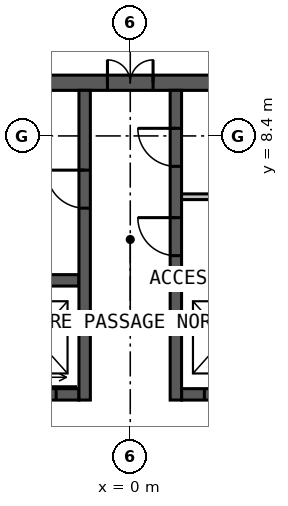
"""IFC4 building model, lengths in metres.
Left out: names, types, materials, properties, quantities, classifications, styles, units other than length and angle.
Written with IfcOpenShell. Run it as: python <this file> out.ifc"""

import sys

from ifc_helpers import new_model, si_unit, direction, frame, frame_2d, origin, place, context, subcontext, project, spatial, rectangle, extrude, element, fill, save


model = new_model("IFC4")
c1 = context("Model", 3, precision=1e-05, world=origin(), true_north=direction((0.0, 1.0)))
c2 = subcontext(c1, "Body", "Model", "MODEL_VIEW")
j1 = project(units=[si_unit("LENGTHUNIT", "METRE"), si_unit("PLANEANGLEUNIT", "RADIAN")], contexts=[c1])
p1 = place(None, origin())
s1 = spatial("IfcSite", under=j1, at=p1, CompositionType="ELEMENT")
p2 = place(p1, origin())
s2 = spatial("IfcBuilding", under=s1, at=p2, CompositionType="ELEMENT")
p3 = place(p2, frame((0.0, 0.0, 276.0)))
s3 = spatial("IfcBuildingStorey", under=s2, at=p3, CompositionType="ELEMENT", Elevation=276.0)
p4 = place(p3, frame((-10.0, 9.8, 0.0), z_axis=(0.0, 0.0, 1.0), x_axis=(1.0, 0.0, 0.0)))
e1 = element("IfcWall", 1, at=p4, inside=s3, PredefinedType="SOLIDWALL", context=c2, shape_type="SweptSolid", body=[
    extrude(rectangle(XDim=20.0, YDim=0.4, at=frame_2d((10.0, 0.0))), origin(), (0.0, 0.0, 1.0), 4.0),
])
p5 = place(p4, frame((9.4, 0.0, 0.0)))
e2 = element("IfcOpeningElement", 2, at=p5, cuts=e1, PredefinedType="OPENING", context=c2, shape_type="SweptSolid", body=[
    extrude(rectangle(XDim=1.2, YDim=2.2, at=frame_2d((0.6, 1.1))), frame((0.0, 0.21, 0.0), z_axis=(0.0, -1.0, 0.0), x_axis=(1.0, 0.0, 0.0)), (0.0, 0.0, 1.0), 0.42),
])
p6 = place(p3, frame((-6.2, 1.6, 0.0), z_axis=(0.0, 0.0, 1.0), x_axis=(1.0, 0.0, 0.0)))
e3 = element("IfcWall", 3, at=p6, inside=s3, PredefinedType="SOLIDWALL", context=c2, shape_type="SweptSolid", body=[
    extrude(rectangle(XDim=4.85, YDim=0.3, at=frame_2d((2.425, 0.0))), origin(), (0.0, 0.0, 1.0), 4.0),
])
p7 = place(p6, frame((0.625, 0.0, 0.0)))
e4 = element("IfcOpeningElement", 4, at=p7, cuts=e3, PredefinedType="OPENING", context=c2, shape_type="SweptSolid", body=[
    extrude(rectangle(XDim=1.1, YDim=2.2, at=frame_2d((0.55, 1.1))), frame((0.0, 0.16, 0.0), z_axis=(0.0, -1.0, 0.0), x_axis=(1.0, 0.0, 0.0)), (0.0, 0.0, 1.0), 0.32),
])
p8 = place(p6, frame((3.15, 0.0, 0.0)))
e5 = element("IfcOpeningElement", 5, at=p8, cuts=e3, PredefinedType="OPENING", context=c2, shape_type="SweptSolid", body=[
    extrude(rectangle(XDim=1.1, YDim=2.2, at=frame_2d((0.55, 1.1))), frame((0.0, 0.16, 0.0), z_axis=(0.0, -1.0, 0.0), x_axis=(1.0, 0.0, 0.0)), (0.0, 0.0, 1.0), 0.32),
])
p9 = place(p3, frame((1.35, 1.6, 0.0), z_axis=(0.0, 0.0, 1.0), x_axis=(1.0, 0.0, 0.0)))
e6 = element("IfcWall", 6, at=p9, inside=s3, PredefinedType="SOLIDWALL", context=c2, shape_type="SweptSolid", body=[
    extrude(rectangle(XDim=4.85, YDim=0.3, at=frame_2d((2.425, 0.0))), origin(), (0.0, 0.0, 1.0), 4.0),
])
p10 = place(p9, frame((0.6, 0.0, 0.0)))
e7 = element("IfcOpeningElement", 7, at=p10, cuts=e6, PredefinedType="OPENING", context=c2, shape_type="SweptSolid", body=[
    extrude(rectangle(XDim=1.1, YDim=2.2, at=frame_2d((0.55, 1.1))), frame((0.0, 0.16, 0.0), z_axis=(0.0, -1.0, 0.0), x_axis=(1.0, 0.0, 0.0)), (0.0, 0.0, 1.0), 0.32),
])
p11 = place(p9, frame((3.125, 0.0, 0.0)))
e8 = element("IfcOpeningElement", 8, at=p11, cuts=e6, PredefinedType="OPENING", context=c2, shape_type="SweptSolid", body=[
    extrude(rectangle(XDim=1.1, YDim=2.2, at=frame_2d((0.55, 1.1))), frame((0.0, 0.16, 0.0), z_axis=(0.0, -1.0, 0.0), x_axis=(1.0, 0.0, 0.0)), (0.0, 0.0, 1.0), 0.32),
])
for number, where, z_axis, x_axis in (
    (9, (-6.2, 4.6, 0.0), (0.0, 0.0, 1.0), (1.0, 0.0, 0.0)),
    (10, (1.35, 4.6, 0.0), (0.0, 0.0, 1.0), (1.0, 0.0, 0.0)),
):
    element("IfcWall", number, at=place(p3, frame(where, z_axis=z_axis, x_axis=x_axis)), inside=s3, PredefinedType="SOLIDWALL", context=c2, shape_type="SweptSolid", body=[
        extrude(rectangle(XDim=4.85, YDim=0.3, at=frame_2d((2.425, 0.0))), origin(), (0.0, 0.0, 1.0), 4.0),
    ])
p12 = place(p3, frame((-1.2, 1.45, 0.0), z_axis=(0.0, 0.0, 1.0), x_axis=(0.0, 1.0, 0.0)))
e11 = element("IfcWall", 11, at=p12, inside=s3, PredefinedType="SOLIDWALL", context=c2, shape_type="SweptSolid", body=[
    extrude(rectangle(XDim=8.15, YDim=0.3, at=frame_2d((4.075, 0.0))), origin(), (0.0, 0.0, 1.0), 4.0),
])
p13 = place(p12, frame((5.05, 0.0, 0.0)))
e12 = element("IfcOpeningElement", 12, at=p13, cuts=e11, PredefinedType="OPENING", context=c2, shape_type="SweptSolid", body=[
    extrude(rectangle(XDim=1.0, YDim=2.2, at=frame_2d((0.5, 1.1))), frame((0.0, 0.16, 0.0), z_axis=(0.0, -1.0, 0.0), x_axis=(1.0, 0.0, 0.0)), (0.0, 0.0, 1.0), 0.32),
])
p14 = place(p3, frame((1.2, 1.45, 0.0), z_axis=(0.0, 0.0, 1.0), x_axis=(0.0, 1.0, 0.0)))
e13 = element("IfcWall", 13, at=p14, inside=s3, PredefinedType="SOLIDWALL", context=c2, shape_type="SweptSolid", body=[
    extrude(rectangle(XDim=8.15, YDim=0.3, at=frame_2d((4.075, 0.0))), origin(), (0.0, 0.0, 1.0), 4.0),
])
p15 = place(p14, frame((3.8, 0.0, 0.0)))
e14 = element("IfcOpeningElement", 14, at=p15, cuts=e13, PredefinedType="OPENING", context=c2, shape_type="SweptSolid", body=[
    extrude(rectangle(XDim=1.0, YDim=2.2, at=frame_2d((0.5, 1.1))), frame((0.0, 0.16, 0.0), z_axis=(0.0, -1.0, 0.0), x_axis=(1.0, 0.0, 0.0)), (0.0, 0.0, 1.0), 0.32),
])
p16 = place(p14, frame((6.15, 0.0, 0.0)))
e15 = element("IfcOpeningElement", 15, at=p16, cuts=e13, PredefinedType="OPENING", context=c2, shape_type="SweptSolid", body=[
    extrude(rectangle(XDim=1.0, YDim=2.2, at=frame_2d((0.5, 1.1))), frame((0.0, 0.16, 0.0), z_axis=(0.0, -1.0, 0.0), x_axis=(1.0, 0.0, 0.0)), (0.0, 0.0, 1.0), 0.32),
])
p17 = place(p3, frame((1.35, 6.8, 0.0), z_axis=(0.0, 0.0, 1.0), x_axis=(1.0, 0.0, 0.0)))
e16 = element("IfcWall", 16, at=p17, inside=s3, PredefinedType="PARTITIONING", context=c2, shape_type="SweptSolid", body=[
    extrude(rectangle(XDim=4.85, YDim=0.15, at=frame_2d((2.425, 0.0))), origin(), (0.0, 0.0, 1.0), 3.75),
])
p18 = place(p17, frame((3.15, 0.0, 0.0)))
e17 = element("IfcOpeningElement", 17, at=p18, cuts=e16, PredefinedType="OPENING", context=c2, shape_type="SweptSolid", body=[
    extrude(rectangle(XDim=0.9, YDim=2.2, at=frame_2d((0.45, 1.1))), frame((0.0, 0.085, 0.0), z_axis=(0.0, -1.0, 0.0), x_axis=(1.0, 0.0, 0.0)), (0.0, 0.0, 1.0), 0.17),
])
p19 = place(p5, origin())
e18 = element("IfcDoor", 18, at=p19, inside=s3, OperationType="DOUBLE_DOOR_SINGLE_SWING", PredefinedType="DOOR", context=c2, shape_type="SweptSolid", body=[
    extrude(rectangle(XDim=1.2, YDim=2.2, at=frame_2d((0.6, 1.1))), frame((0.0, 0.025, 0.0), z_axis=(0.0, -1.0, 0.0), x_axis=(1.0, 0.0, 0.0)), (0.0, 0.0, 1.0), 0.05),
])
fill(e2, e18)
p20 = place(p13, origin())
e19 = element("IfcDoor", 19, at=p20, inside=s3, OperationType="SINGLE_SWING_RIGHT", PredefinedType="DOOR", context=c2, shape_type="SweptSolid", body=[
    extrude(rectangle(XDim=1.0, YDim=2.2, at=frame_2d((0.5, 1.1))), frame((0.0, 0.025, 0.0), z_axis=(0.0, -1.0, 0.0), x_axis=(1.0, 0.0, 0.0)), (0.0, 0.0, 1.0), 0.05),
])
fill(e12, e19)
p21 = place(p15, origin())
e20 = element("IfcDoor", 20, at=p21, inside=s3, OperationType="SINGLE_SWING_RIGHT", PredefinedType="DOOR", context=c2, shape_type="SweptSolid", body=[
    extrude(rectangle(XDim=1.0, YDim=2.2, at=frame_2d((0.5, 1.1))), frame((0.0, 0.025, 0.0), z_axis=(0.0, -1.0, 0.0), x_axis=(1.0, 0.0, 0.0)), (0.0, 0.0, 1.0), 0.05),
])
fill(e14, e20)
p22 = place(p16, origin())
e21 = element("IfcDoor", 21, at=p22, inside=s3, OperationType="SINGLE_SWING_RIGHT", PredefinedType="DOOR", context=c2, shape_type="SweptSolid", body=[
    extrude(rectangle(XDim=1.0, YDim=2.2, at=frame_2d((0.5, 1.1))), frame((0.0, 0.025, 0.0), z_axis=(0.0, -1.0, 0.0), x_axis=(1.0, 0.0, 0.0)), (0.0, 0.0, 1.0), 0.05),
])
fill(e15, e21)
p23 = place(p8, origin())
e22 = element("IfcDoor", 22, at=p23, inside=s3, OperationType="SLIDING_TO_LEFT", PredefinedType="DOOR", context=c2, shape_type="SweptSolid", body=[
    extrude(rectangle(XDim=1.1, YDim=2.2, at=frame_2d((0.55, 1.1))), frame((0.0, 0.025, 0.0), z_axis=(0.0, -1.0, 0.0), x_axis=(1.0, 0.0, 0.0)), (0.0, 0.0, 1.0), 0.05),
])
fill(e5, e22)
p24 = place(p10, origin())
e23 = element("IfcDoor", 23, at=p24, inside=s3, OperationType="SLIDING_TO_LEFT", PredefinedType="DOOR", context=c2, shape_type="SweptSolid", body=[
    extrude(rectangle(XDim=1.1, YDim=2.2, at=frame_2d((0.55, 1.1))), frame((0.0, 0.025, 0.0), z_axis=(0.0, -1.0, 0.0), x_axis=(1.0, 0.0, 0.0)), (0.0, 0.0, 1.0), 0.05),
])
fill(e7, e23)
save(model, sys.argv[1])
